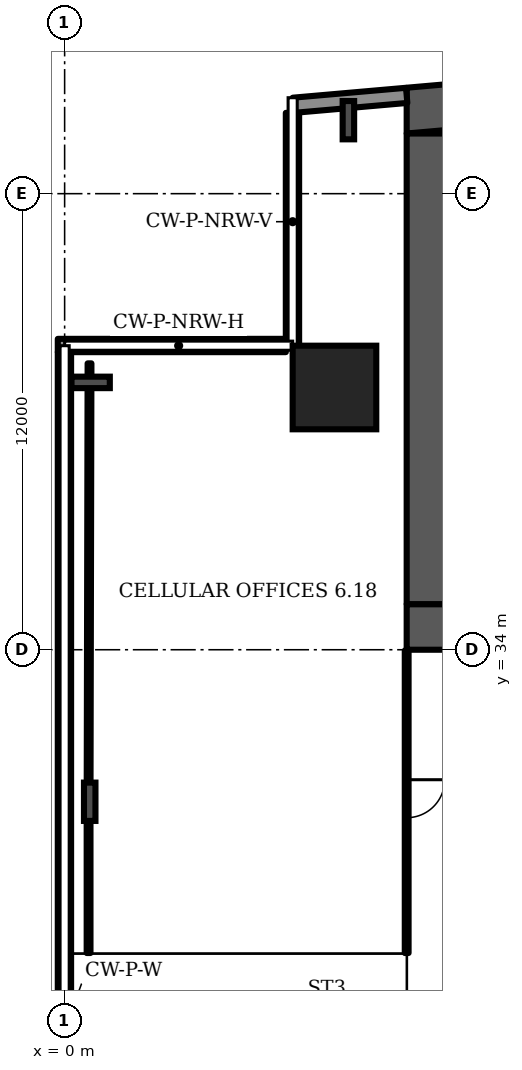
"""IFC4 building model, lengths in metres.
Left out: names, types, materials, properties, quantities, classifications, styles, units other than length and angle.
Written with IfcOpenShell. Run it as: python <this file> out.ifc"""

import sys

from ifc_helpers import new_model, si_unit, direction, frame, frame_2d, origin, origin_2d, place, context, subcontext, project, spatial, polyline, rectangle, i_section, outline, extrude, element, fill, save


model = new_model("IFC4")
c1 = context("Model", 3, precision=1e-05, world=origin(), true_north=direction((0.0, 1.0)))
c2 = subcontext(c1, "Body", "Model", "MODEL_VIEW")
j1 = project(units=[si_unit("LENGTHUNIT", "METRE"), si_unit("PLANEANGLEUNIT", "RADIAN")], contexts=[c1])
p1 = place(None, origin())
s1 = spatial("IfcSite", under=j1, at=p1, CompositionType="ELEMENT")
p2 = place(p1, origin())
s2 = spatial("IfcBuilding", under=s1, at=p2, CompositionType="ELEMENT")
p3 = place(p2, frame((0.0, 0.0, 41.5)))
s3 = spatial("IfcBuildingStorey", under=s2, at=p3, CompositionType="ELEMENT", Elevation=41.5)
p4 = place(p3, origin())
e1 = element("IfcWall", 1, at=p4, inside=s3, PredefinedType="SHEAR", context=c2, shape_type="SweptSolid", body=[
    extrude(outline(polyline([(9.0, 47.583), (37.0, 50.032), (65.0, 47.583), (65.0, 48.787), (37.0, 51.237), (9.0, 48.787), (9.0, 47.583)])), origin(), (0.0, 0.0, 1.0), 3.6),
])
p5 = place(p3, frame((9.0, 34.6, 0.0), z_axis=(0.0, 0.0, 1.0), x_axis=(1.0, 0.0, 0.0)))
e2 = element("IfcWall", 2, at=p5, inside=s3, PredefinedType="SHEAR", context=c2, shape_type="SweptSolid", body=[
    extrude(rectangle(XDim=56.0, YDim=1.2, at=frame_2d((28.0, 0.0))), origin(), (0.0, 0.0, 1.0), 3.6),
])
p6 = place(p5, frame((3.3, 0.0, 0.0)))
e3 = element("IfcOpeningElement", 3, at=p6, cuts=e2, PredefinedType="OPENING", context=c2, shape_type="SweptSolid", body=[
    extrude(rectangle(XDim=1.0, YDim=2.1, at=frame_2d((0.5, 1.05))), frame((0.0, 0.61, 0.0), z_axis=(0.0, -1.0, 0.0), x_axis=(1.0, 0.0, 0.0)), (0.0, 0.0, 1.0), 1.22),
])
p7 = place(p5, frame((7.867, 0.0, 0.0)))
e4 = element("IfcOpeningElement", 4, at=p7, cuts=e2, PredefinedType="OPENING", context=c2, shape_type="SweptSolid", body=[
    extrude(rectangle(XDim=1.1, YDim=2.1, at=frame_2d((0.55, 1.05))), frame((0.0, 0.61, 0.0), z_axis=(0.0, -1.0, 0.0), x_axis=(1.0, 0.0, 0.0)), (0.0, 0.0, 1.0), 1.22),
])
p8 = place(p5, frame((12.033, 0.0, 0.0)))
e5 = element("IfcOpeningElement", 5, at=p8, cuts=e2, PredefinedType="OPENING", context=c2, shape_type="SweptSolid", body=[
    extrude(rectangle(XDim=1.1, YDim=2.1, at=frame_2d((0.55, 1.05))), frame((0.0, 0.61, 0.0), z_axis=(0.0, -1.0, 0.0), x_axis=(1.0, 0.0, 0.0)), (0.0, 0.0, 1.0), 1.22),
])
p9 = place(p5, frame((9.8, 0.0, 0.0)))
e6 = element("IfcOpeningElement", 6, at=p9, cuts=e2, PredefinedType="OPENING", context=c2, shape_type="SweptSolid", body=[
    extrude(rectangle(XDim=1.4, YDim=2.1, at=frame_2d((0.7, 1.05))), frame((0.0, 0.61, 0.0), z_axis=(0.0, -1.0, 0.0), x_axis=(1.0, 0.0, 0.0)), (0.0, 0.0, 1.0), 1.22),
])
p10 = place(p5, frame((14.65, 0.0, 0.0)))
e7 = element("IfcOpeningElement", 7, at=p10, cuts=e2, PredefinedType="OPENING", context=c2, shape_type="SweptSolid", body=[
    extrude(rectangle(XDim=1.2, YDim=2.1, at=frame_2d((0.6, 1.05))), frame((0.0, 0.61, 0.0), z_axis=(0.0, -1.0, 0.0), x_axis=(1.0, 0.0, 0.0)), (0.0, 0.0, 1.0), 1.22),
])
p11 = place(p5, frame((21.867, 0.0, 0.0)))
e8 = element("IfcOpeningElement", 8, at=p11, cuts=e2, PredefinedType="OPENING", context=c2, shape_type="SweptSolid", body=[
    extrude(rectangle(XDim=1.1, YDim=2.1, at=frame_2d((0.55, 1.05))), frame((0.0, 0.61, 0.0), z_axis=(0.0, -1.0, 0.0), x_axis=(1.0, 0.0, 0.0)), (0.0, 0.0, 1.0), 1.22),
])
p12 = place(p5, frame((26.033, 0.0, 0.0)))
e9 = element("IfcOpeningElement", 9, at=p12, cuts=e2, PredefinedType="OPENING", context=c2, shape_type="SweptSolid", body=[
    extrude(rectangle(XDim=1.1, YDim=2.1, at=frame_2d((0.55, 1.05))), frame((0.0, 0.61, 0.0), z_axis=(0.0, -1.0, 0.0), x_axis=(1.0, 0.0, 0.0)), (0.0, 0.0, 1.0), 1.22),
])
p13 = place(p5, frame((23.8, 0.0, 0.0)))
e10 = element("IfcOpeningElement", 10, at=p13, cuts=e2, PredefinedType="OPENING", context=c2, shape_type="SweptSolid", body=[
    extrude(rectangle(XDim=1.4, YDim=2.1, at=frame_2d((0.7, 1.05))), frame((0.0, 0.61, 0.0), z_axis=(0.0, -1.0, 0.0), x_axis=(1.0, 0.0, 0.0)), (0.0, 0.0, 1.0), 1.22),
])
p14 = place(p5, frame((28.867, 0.0, 0.0)))
e11 = element("IfcOpeningElement", 11, at=p14, cuts=e2, PredefinedType="OPENING", context=c2, shape_type="SweptSolid", body=[
    extrude(rectangle(XDim=1.1, YDim=2.1, at=frame_2d((0.55, 1.05))), frame((0.0, 0.61, 0.0), z_axis=(0.0, -1.0, 0.0), x_axis=(1.0, 0.0, 0.0)), (0.0, 0.0, 1.0), 1.22),
])
p15 = place(p5, frame((33.033, 0.0, 0.0)))
e12 = element("IfcOpeningElement", 12, at=p15, cuts=e2, PredefinedType="OPENING", context=c2, shape_type="SweptSolid", body=[
    extrude(rectangle(XDim=1.1, YDim=2.1, at=frame_2d((0.55, 1.05))), frame((0.0, 0.61, 0.0), z_axis=(0.0, -1.0, 0.0), x_axis=(1.0, 0.0, 0.0)), (0.0, 0.0, 1.0), 1.22),
])
p16 = place(p5, frame((40.15, 0.0, 0.0)))
e13 = element("IfcOpeningElement", 13, at=p16, cuts=e2, PredefinedType="OPENING", context=c2, shape_type="SweptSolid", body=[
    extrude(rectangle(XDim=1.2, YDim=2.1, at=frame_2d((0.6, 1.05))), frame((0.0, 0.61, 0.0), z_axis=(0.0, -1.0, 0.0), x_axis=(1.0, 0.0, 0.0)), (0.0, 0.0, 1.0), 1.22),
])
p17 = place(p5, frame((44.8, 0.0, 0.0)))
e14 = element("IfcOpeningElement", 14, at=p17, cuts=e2, PredefinedType="OPENING", context=c2, shape_type="SweptSolid", body=[
    extrude(rectangle(XDim=1.4, YDim=2.1, at=frame_2d((0.7, 1.05))), frame((0.0, 0.61, 0.0), z_axis=(0.0, -1.0, 0.0), x_axis=(1.0, 0.0, 0.0)), (0.0, 0.0, 1.0), 1.22),
])
p18 = place(p5, frame((49.867, 0.0, 0.0)))
e15 = element("IfcOpeningElement", 15, at=p18, cuts=e2, PredefinedType="OPENING", context=c2, shape_type="SweptSolid", body=[
    extrude(rectangle(XDim=1.1, YDim=2.1, at=frame_2d((0.55, 1.05))), frame((0.0, 0.61, 0.0), z_axis=(0.0, -1.0, 0.0), x_axis=(1.0, 0.0, 0.0)), (0.0, 0.0, 1.0), 1.22),
])
p19 = place(p5, frame((53.5, 0.0, 0.0)))
e16 = element("IfcOpeningElement", 16, at=p19, cuts=e2, PredefinedType="OPENING", context=c2, shape_type="SweptSolid", body=[
    extrude(rectangle(XDim=1.1, YDim=2.1, at=frame_2d((0.55, 1.05))), frame((0.0, 0.61, 0.0), z_axis=(0.0, -1.0, 0.0), x_axis=(1.0, 0.0, 0.0)), (0.0, 0.0, 1.0), 1.22),
])
p20 = place(p5, frame((51.567, 0.0, 0.0)))
e17 = element("IfcOpeningElement", 17, at=p20, cuts=e2, PredefinedType="OPENING", context=c2, shape_type="SweptSolid", body=[
    extrude(rectangle(XDim=1.4, YDim=2.1, at=frame_2d((0.7, 1.05))), frame((0.0, 0.61, 0.0), z_axis=(0.0, -1.0, 0.0), x_axis=(1.0, 0.0, 0.0)), (0.0, 0.0, 1.0), 1.22),
])
p21 = place(p3, frame((9.6, 35.2, 0.0), z_axis=(0.0, 0.0, 1.0), x_axis=(0.0, 1.0, 0.0)))
e18 = element("IfcWall", 18, at=p21, inside=s3, PredefinedType="SHEAR", context=c2, shape_type="SweptSolid", body=[
    extrude(rectangle(XDim=12.383, YDim=1.2, at=frame_2d((6.191, 0.0))), origin(), (0.0, 0.0, 1.0), 3.6),
])
p22 = place(p3, frame((7.1, 40.9, 0.0), z_axis=(0.0, 0.0, 1.0), x_axis=(1.0, 0.0, 0.0)))
e19 = element("IfcColumn", 19, at=p22, inside=s3, PredefinedType="COLUMN", context=c2, shape_type="SweptSolid", body=[
    extrude(rectangle(XDim=2.2, YDim=2.2, at=origin_2d()), origin(), (0.0, 0.0, 1.0), 3.6),
])
for number, where, z_axis, x_axis in (
    (20, (7.467, 47.934, 0.0), (0.0, 0.0, 1.0), (-1.0, 0.0, 0.0)),
    (21, (0.685, 41.034, 0.0), (0.0, 0.0, 1.0), (0.0, 1.0, 0.0)),
    (22, (0.66, 30.0, 0.0), (0.0, 0.0, 1.0), (-1.0, 0.0, 0.0)),
):
    element("IfcColumn", number, at=place(p3, frame(where, z_axis=z_axis, x_axis=x_axis)), inside=s3, PredefinedType="COLUMN", context=c2, shape_type="SweptSolid", body=[
        extrude(i_section(OverallWidth=0.302, OverallDepth=1.008, WebThickness=0.021, FlangeThickness=0.04, FilletRadius=0.03, at=origin_2d()), origin(), (0.0, 0.0, 1.0), 3.6),
    ])
p23 = place(p3, frame((9.0, 48.587, 0.0), z_axis=(0.0, 0.0, 1.0), x_axis=(-0.996194, -0.087168, 0.0)))
e23 = element("IfcWall", 23, at=p23, inside=s3, PredefinedType="SOLIDWALL", context=c2, shape_type="SweptSolid", body=[
    extrude(rectangle(XDim=2.994, YDim=0.4, at=frame_2d((1.497, 0.0))), origin(), (0.0, 0.0, 1.0), 3.2),
])
p24 = place(p3, frame((5.995, 48.126, 0.0), z_axis=(0.0, 0.0, 1.0), x_axis=(0.0, -1.0, 0.0)))
e24 = element("IfcWall", 24, at=p24, inside=s3, PredefinedType="SOLIDWALL", context=c2, shape_type="SweptSolid", body=[
    extrude(rectangle(XDim=6.126, YDim=0.35, at=frame_2d((3.063, 0.0))), origin(), (0.0, 0.0, 1.0), 1.0),
])
p25 = place(p3, frame((5.82, 42.005, 0.0), z_axis=(0.0, 0.0, 1.0), x_axis=(-1.0, 0.0, 0.0)))
e25 = element("IfcWall", 25, at=p25, inside=s3, PredefinedType="SOLIDWALL", context=c2, shape_type="SweptSolid", body=[
    extrude(rectangle(XDim=6.0, YDim=0.35, at=frame_2d((3.0, 0.0))), origin(), (0.0, 0.0, 1.0), 1.0),
])
p26 = place(p3, frame((-0.005, 41.83, 0.0), z_axis=(0.0, 0.0, 1.0), x_axis=(0.0, -1.0, 0.0)))
e26 = element("IfcWall", 26, at=p26, inside=s3, PredefinedType="SOLIDWALL", context=c2, shape_type="SweptSolid", body=[
    extrude(rectangle(XDim=36.01, YDim=0.35, at=frame_2d((18.005, 0.0))), origin(), (0.0, 0.0, 1.0), 1.0),
])
p27 = place(p3, frame((0.63, 26.02, 0.0), z_axis=(0.0, 0.0, 1.0), x_axis=(0.0, 1.0, 0.0)))
e27 = element("IfcWall", 27, at=p27, inside=s3, PredefinedType="PARTITIONING", context=c2, shape_type="SweptSolid", body=[
    extrude(rectangle(XDim=3.98, YDim=0.1, at=frame_2d((1.99, 0.0))), origin(), (0.0, 0.0, 1.0), 2.58),
])
p28 = place(p3, frame((0.63, 30.0, 0.0), z_axis=(0.0, 0.0, 1.0), x_axis=(0.00218, 0.999994, 0.0)))
e28 = element("IfcWall", 28, at=p28, inside=s3, PredefinedType="PARTITIONING", context=c2, shape_type="SweptSolid", body=[
    extrude(rectangle(XDim=11.535, YDim=0.1, at=frame_2d((5.768, 0.0))), origin(), (0.0, 0.0, 1.0), 2.58),
])
p29 = place(p3, frame((9.0, 26.02, 0.0), z_axis=(0.0, 0.0, 1.0), x_axis=(0.0, 1.0, 0.0)))
e29 = element("IfcWall", 29, at=p29, inside=s3, PredefinedType="PARTITIONING", context=c2, shape_type="SweptSolid", body=[
    extrude(rectangle(XDim=7.96, YDim=0.1, at=frame_2d((3.98, 0.0))), origin(), (0.0, 0.0, 1.0), 3.2),
])
p30 = place(p29, frame((3.56, 0.0, 0.0)))
e30 = element("IfcOpeningElement", 30, at=p30, cuts=e29, PredefinedType="OPENING", context=c2, shape_type="SweptSolid", body=[
    extrude(rectangle(XDim=1.0, YDim=2.1, at=frame_2d((0.5, 1.05))), frame((0.0, 0.06, 0.0), z_axis=(0.0, -1.0, 0.0), x_axis=(1.0, 0.0, 0.0)), (0.0, 0.0, 1.0), 0.12),
])
p31 = place(p30, origin())
e31 = element("IfcDoor", 31, at=p31, inside=s3, OperationType="SINGLE_SWING_RIGHT", PredefinedType="DOOR", context=c2, shape_type="SweptSolid", body=[
    extrude(rectangle(XDim=1.0, YDim=2.1, at=frame_2d((0.5, 1.05))), frame((0.0, 0.025, 0.0), z_axis=(0.0, -1.0, 0.0), x_axis=(1.0, 0.0, 0.0)), (0.0, 0.0, 1.0), 0.05),
])
fill(e30, e31)
save(model, sys.argv[1])
